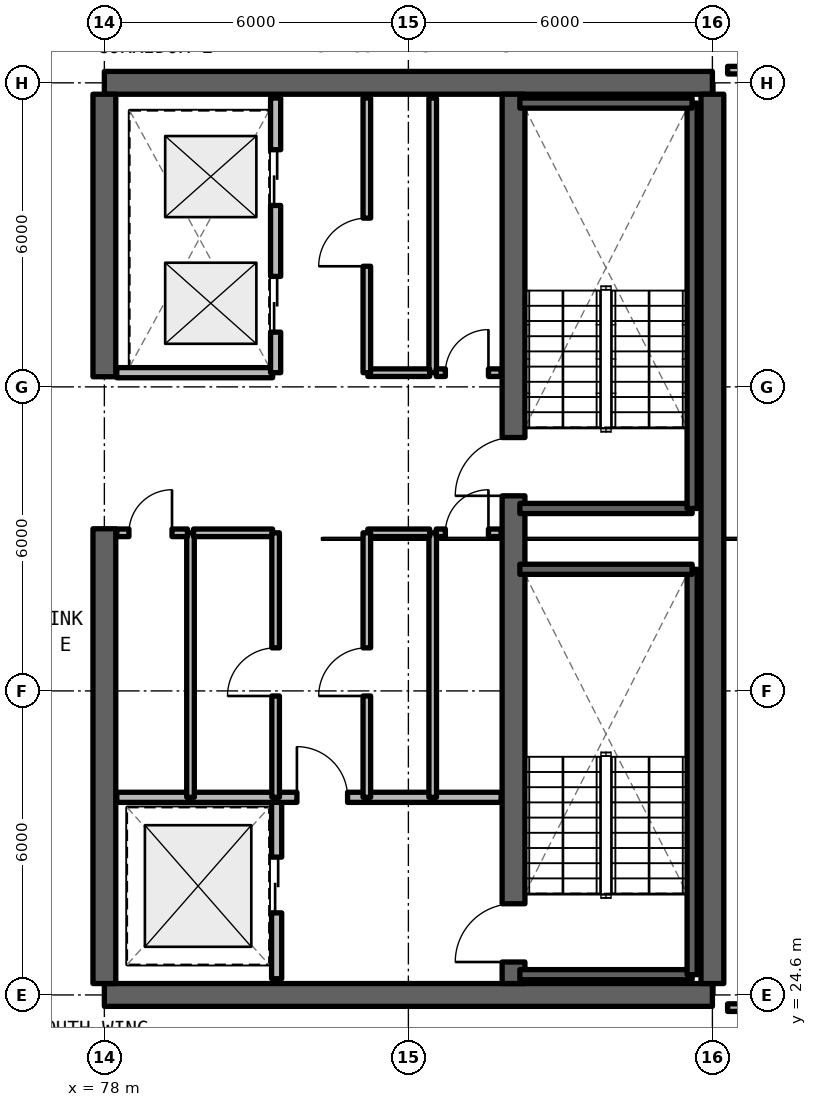
"""IFC4 building model, lengths in metres.
Left out: names, types, materials, properties, quantities, classifications, styles, units other than length and angle.
Written with IfcOpenShell. Run it as: python <this file> out.ifc"""

import sys

from ifc_helpers import new_model, si_unit, direction, frame, frame_2d, origin, place, context, subcontext, project, spatial, rectangle, extrude, element, fill, save


model = new_model("IFC4")
c1 = context("Model", 3, precision=1e-05, world=origin(), true_north=direction((0.0, 1.0)))
c2 = subcontext(c1, "Body", "Model", "MODEL_VIEW")
j1 = project(units=[si_unit("LENGTHUNIT", "METRE"), si_unit("PLANEANGLEUNIT", "RADIAN")], contexts=[c1])
p1 = place(None, origin())
s1 = spatial("IfcSite", under=j1, at=p1, CompositionType="ELEMENT")
p2 = place(p1, origin())
s2 = spatial("IfcBuilding", under=s1, at=p2, CompositionType="ELEMENT")
p3 = place(p2, frame((0.0, 0.0, 235.95)))
s3 = spatial("IfcBuildingStorey", under=s2, at=p3, CompositionType="ELEMENT", Elevation=235.95)
for number, where, z_axis, x_axis in (
    (1, (78.0, 24.6, 0.0), (0.0, 0.0, 1.0), (1.0, 0.0, 0.0)),
    (2, (90.0, 42.6, 0.0), (0.0, 0.0, 1.0), (-1.0, 0.0, 0.0)),
):
    element("IfcWall", number, at=place(p3, frame(where, z_axis=z_axis, x_axis=x_axis)), inside=s3, PredefinedType="SHEAR", context=c2, shape_type="SweptSolid", body=[
        extrude(rectangle(XDim=12.0, YDim=0.45, at=frame_2d((6.0, 0.0))), origin(), (0.0, 0.0, 1.0), 3.3),
    ])
p4 = place(p3, frame((90.0, 24.825, 0.0), z_axis=(0.0, 0.0, 1.0), x_axis=(0.0, 1.0, 0.0)))
e3 = element("IfcWall", 3, at=p4, inside=s3, PredefinedType="SHEAR", context=c2, shape_type="SweptSolid", body=[
    extrude(rectangle(XDim=17.55, YDim=0.45, at=frame_2d((8.775, 0.0))), origin(), (0.0, 0.0, 1.0), 3.3),
])
p5 = place(p3, frame((78.0, 24.825, 0.0), z_axis=(0.0, 0.0, 1.0), x_axis=(0.0, 1.0, 0.0)))
e4 = element("IfcWall", 4, at=p5, inside=s3, PredefinedType="SHEAR", context=c2, shape_type="SweptSolid", body=[
    extrude(rectangle(XDim=8.975, YDim=0.45, at=frame_2d((4.488, 0.0))), origin(), (0.0, 0.0, 1.0), 3.3),
])
p6 = place(p3, frame((78.0, 36.8, 0.0), z_axis=(0.0, 0.0, 1.0), x_axis=(0.0, 1.0, 0.0)))
e5 = element("IfcWall", 5, at=p6, inside=s3, PredefinedType="SHEAR", context=c2, shape_type="SweptSolid", body=[
    extrude(rectangle(XDim=5.575, YDim=0.45, at=frame_2d((2.788, 0.0))), origin(), (0.0, 0.0, 1.0), 3.3),
])
p7 = place(p3, frame((86.075, 24.825, 0.0), z_axis=(0.0, 0.0, 1.0), x_axis=(0.0, 1.0, 0.0)))
e6 = element("IfcWall", 6, at=p7, inside=s3, PredefinedType="SHEAR", context=c2, shape_type="SweptSolid", body=[
    extrude(rectangle(XDim=17.55, YDim=0.45, at=frame_2d((8.775, 0.0))), origin(), (0.0, 0.0, 1.0), 3.3),
])
p8 = place(p7, frame((0.425, 0.0, 0.0)))
e7 = element("IfcOpeningElement", 7, at=p8, cuts=e6, PredefinedType="OPENING", context=c2, shape_type="SweptSolid", body=[
    extrude(rectangle(XDim=1.15, YDim=2.15, at=frame_2d((0.575, 1.075))), frame((0.0, 0.235, 0.0), z_axis=(0.0, -1.0, 0.0), x_axis=(1.0, 0.0, 0.0)), (0.0, 0.0, 1.0), 0.47),
])
p9 = place(p7, frame((9.625, 0.0, 0.0)))
e8 = element("IfcOpeningElement", 8, at=p9, cuts=e6, PredefinedType="OPENING", context=c2, shape_type="SweptSolid", body=[
    extrude(rectangle(XDim=1.15, YDim=2.15, at=frame_2d((0.575, 1.075))), frame((0.0, 0.235, 0.0), z_axis=(0.0, -1.0, 0.0), x_axis=(1.0, 0.0, 0.0)), (0.0, 0.0, 1.0), 0.47),
])
p10 = place(p3, frame((81.4, 24.92, 0.0), z_axis=(0.0, 0.0, 1.0), x_axis=(0.0, 1.0, 0.0)))
e9 = element("IfcWall", 9, at=p10, inside=s3, PredefinedType="SOLIDWALL", context=c2, shape_type="SweptSolid", body=[
    extrude(rectangle(XDim=3.58, YDim=0.2, at=frame_2d((1.79, 0.0))), origin(), (0.0, 0.0, 1.0), 2.35),
])
p11 = place(p10, frame((1.3, 0.0, 0.0)))
e10 = element("IfcOpeningElement", 10, at=p11, cuts=e9, PredefinedType="OPENING", context=c2, shape_type="SweptSolid", body=[
    extrude(rectangle(XDim=1.1, YDim=2.2, at=frame_2d((0.55, 1.1))), frame((0.0, 0.11, 0.0), z_axis=(0.0, -1.0, 0.0), x_axis=(1.0, 0.0, 0.0)), (0.0, 0.0, 1.0), 0.22),
])
p12 = place(p3, frame((78.245, 28.5, 0.0), z_axis=(0.0, 0.0, 1.0), x_axis=(1.0, 0.0, 0.0)))
e11 = element("IfcWall", 11, at=p12, inside=s3, PredefinedType="SOLIDWALL", context=c2, shape_type="SweptSolid", body=[
    extrude(rectangle(XDim=7.585, YDim=0.2, at=frame_2d((3.792, 0.0))), origin(), (0.0, 0.0, 1.0), 2.35),
])
p13 = place(p12, frame((3.555, 0.0, 0.0)))
e12 = element("IfcOpeningElement", 12, at=p13, cuts=e11, PredefinedType="OPENING", context=c2, shape_type="SweptSolid", body=[
    extrude(rectangle(XDim=1.0, YDim=2.15, at=frame_2d((0.5, 1.075))), frame((0.0, 0.11, 0.0), z_axis=(0.0, -1.0, 0.0), x_axis=(1.0, 0.0, 0.0)), (0.0, 0.0, 1.0), 0.22),
])
p14 = place(p3, frame((84.48, 28.5, 0.0), z_axis=(0.0, 0.0, 1.0), x_axis=(0.0, 1.0, 0.0)))
e13 = element("IfcWall", 13, at=p14, inside=s3, PredefinedType="SOLIDWALL", context=c2, shape_type="SweptSolid", body=[
    extrude(rectangle(XDim=5.22, YDim=0.15, at=frame_2d((2.61, 0.0))), origin(), (0.0, 0.0, 1.0), 2.35),
])
p15 = place(p3, frame((84.55, 33.72, 0.0), z_axis=(0.0, 0.0, 1.0), x_axis=(1.0, 0.0, 0.0)))
e14 = element("IfcWall", 14, at=p15, inside=s3, PredefinedType="SOLIDWALL", context=c2, shape_type="SweptSolid", body=[
    extrude(rectangle(XDim=1.28, YDim=0.15, at=frame_2d((0.64, 0.0))), origin(), (0.0, 0.0, 1.0), 2.35),
])
p16 = place(p15, frame((0.18, 0.0, 0.0)))
e15 = element("IfcOpeningElement", 15, at=p16, cuts=e14, PredefinedType="OPENING", context=c2, shape_type="SweptSolid", body=[
    extrude(rectangle(XDim=0.85, YDim=2.1, at=frame_2d((0.425, 1.05))), frame((0.0, 0.085, 0.0), z_axis=(0.0, -1.0, 0.0), x_axis=(1.0, 0.0, 0.0)), (0.0, 0.0, 1.0), 0.17),
])
p17 = place(p3, frame((83.2, 33.72, 0.0), z_axis=(0.0, 0.0, 1.0), x_axis=(1.0, 0.0, 0.0)))
e16 = element("IfcWall", 16, at=p17, inside=s3, PredefinedType="SOLIDWALL", context=c2, shape_type="SweptSolid", body=[
    extrude(rectangle(XDim=1.22, YDim=0.15, at=frame_2d((0.61, 0.0))), origin(), (0.0, 0.0, 1.0), 2.35),
])
p18 = place(p3, frame((83.18, 28.5, 0.0), z_axis=(0.0, 0.0, 1.0), x_axis=(0.0, 1.0, 0.0)))
e17 = element("IfcWall", 17, at=p18, inside=s3, PredefinedType="SOLIDWALL", context=c2, shape_type="SweptSolid", body=[
    extrude(rectangle(XDim=5.22, YDim=0.15, at=frame_2d((2.61, 0.0))), origin(), (0.0, 0.0, 1.0), 2.35),
])
p19 = place(p18, frame((2.0, 0.0, 0.0)))
e18 = element("IfcOpeningElement", 18, at=p19, cuts=e17, PredefinedType="OPENING", context=c2, shape_type="SweptSolid", body=[
    extrude(rectangle(XDim=0.95, YDim=2.15, at=frame_2d((0.475, 1.075))), frame((0.0, 0.085, 0.0), z_axis=(0.0, -1.0, 0.0), x_axis=(1.0, 0.0, 0.0)), (0.0, 0.0, 1.0), 0.17),
])
p20 = place(p3, frame((79.7, 28.5, 0.0), z_axis=(0.0, 0.0, 1.0), x_axis=(0.0, 1.0, 0.0)))
e19 = element("IfcWall", 19, at=p20, inside=s3, PredefinedType="SOLIDWALL", context=c2, shape_type="SweptSolid", body=[
    extrude(rectangle(XDim=5.22, YDim=0.15, at=frame_2d((2.61, 0.0))), origin(), (0.0, 0.0, 1.0), 2.35),
])
p21 = place(p3, frame((79.76, 33.72, 0.0), z_axis=(0.0, 0.0, 1.0), x_axis=(1.0, 0.0, 0.0)))
e20 = element("IfcWall", 20, at=p21, inside=s3, PredefinedType="SOLIDWALL", context=c2, shape_type="SweptSolid", body=[
    extrude(rectangle(XDim=1.56, YDim=0.15, at=frame_2d((0.78, 0.0))), origin(), (0.0, 0.0, 1.0), 2.35),
])
p22 = place(p3, frame((78.245, 33.72, 0.0), z_axis=(0.0, 0.0, 1.0), x_axis=(1.0, 0.0, 0.0)))
e21 = element("IfcWall", 21, at=p22, inside=s3, PredefinedType="SOLIDWALL", context=c2, shape_type="SweptSolid", body=[
    extrude(rectangle(XDim=1.395, YDim=0.15, at=frame_2d((0.697, 0.0))), origin(), (0.0, 0.0, 1.0), 2.35),
])
p23 = place(p22, frame((0.24, 0.0, 0.0)))
e22 = element("IfcOpeningElement", 22, at=p23, cuts=e21, PredefinedType="OPENING", context=c2, shape_type="SweptSolid", body=[
    extrude(rectangle(XDim=0.85, YDim=2.1, at=frame_2d((0.425, 1.05))), frame((0.0, 0.085, 0.0), z_axis=(0.0, -1.0, 0.0), x_axis=(1.0, 0.0, 0.0)), (0.0, 0.0, 1.0), 0.17),
])
p24 = place(p3, frame((81.38, 28.5, 0.0), z_axis=(0.0, 0.0, 1.0), x_axis=(0.0, 1.0, 0.0)))
e23 = element("IfcWall", 23, at=p24, inside=s3, PredefinedType="SOLIDWALL", context=c2, shape_type="SweptSolid", body=[
    extrude(rectangle(XDim=5.22, YDim=0.15, at=frame_2d((2.61, 0.0))), origin(), (0.0, 0.0, 1.0), 2.35),
])
p25 = place(p24, frame((2.0, 0.0, 0.0)))
e24 = element("IfcOpeningElement", 24, at=p25, cuts=e23, PredefinedType="OPENING", context=c2, shape_type="SweptSolid", body=[
    extrude(rectangle(XDim=0.95, YDim=2.15, at=frame_2d((0.475, 1.075))), frame((0.0, 0.085, 0.0), z_axis=(0.0, -1.0, 0.0), x_axis=(1.0, 0.0, 0.0)), (0.0, 0.0, 1.0), 0.17),
])
p26 = place(p3, frame((84.48, 36.88, 0.0), z_axis=(0.0, 0.0, 1.0), x_axis=(0.0, 1.0, 0.0)))
e25 = element("IfcWall", 25, at=p26, inside=s3, PredefinedType="SOLIDWALL", context=c2, shape_type="SweptSolid", body=[
    extrude(rectangle(XDim=5.42, YDim=0.15, at=frame_2d((2.71, 0.0))), origin(), (0.0, 0.0, 1.0), 2.35),
])
p27 = place(p3, frame((84.55, 36.88, 0.0), z_axis=(0.0, 0.0, 1.0), x_axis=(1.0, 0.0, 0.0)))
e26 = element("IfcWall", 26, at=p27, inside=s3, PredefinedType="SOLIDWALL", context=c2, shape_type="SweptSolid", body=[
    extrude(rectangle(XDim=1.28, YDim=0.15, at=frame_2d((0.64, 0.0))), origin(), (0.0, 0.0, 1.0), 2.35),
])
p28 = place(p27, frame((0.18, 0.0, 0.0)))
e27 = element("IfcOpeningElement", 27, at=p28, cuts=e26, PredefinedType="OPENING", context=c2, shape_type="SweptSolid", body=[
    extrude(rectangle(XDim=0.85, YDim=2.1, at=frame_2d((0.425, 1.05))), frame((0.0, 0.085, 0.0), z_axis=(0.0, -1.0, 0.0), x_axis=(1.0, 0.0, 0.0)), (0.0, 0.0, 1.0), 0.17),
])
p29 = place(p3, frame((83.2, 36.88, 0.0), z_axis=(0.0, 0.0, 1.0), x_axis=(1.0, 0.0, 0.0)))
e28 = element("IfcWall", 28, at=p29, inside=s3, PredefinedType="SOLIDWALL", context=c2, shape_type="SweptSolid", body=[
    extrude(rectangle(XDim=1.22, YDim=0.15, at=frame_2d((0.61, 0.0))), origin(), (0.0, 0.0, 1.0), 2.35),
])
p30 = place(p3, frame((83.18, 36.88, 0.0), z_axis=(0.0, 0.0, 1.0), x_axis=(0.0, 1.0, 0.0)))
e29 = element("IfcWall", 29, at=p30, inside=s3, PredefinedType="SOLIDWALL", context=c2, shape_type="SweptSolid", body=[
    extrude(rectangle(XDim=5.42, YDim=0.15, at=frame_2d((2.71, 0.0))), origin(), (0.0, 0.0, 1.0), 2.35),
])
p31 = place(p30, frame((2.1, 0.0, 0.0)))
e30 = element("IfcOpeningElement", 30, at=p31, cuts=e29, PredefinedType="OPENING", context=c2, shape_type="SweptSolid", body=[
    extrude(rectangle(XDim=0.95, YDim=2.15, at=frame_2d((0.475, 1.075))), frame((0.0, 0.085, 0.0), z_axis=(0.0, -1.0, 0.0), x_axis=(1.0, 0.0, 0.0)), (0.0, 0.0, 1.0), 0.17),
])
p32 = place(p3, frame((78.245, 36.88, 0.0), z_axis=(0.0, 0.0, 1.0), x_axis=(1.0, 0.0, 0.0)))
e31 = element("IfcWall", 31, at=p32, inside=s3, PredefinedType="SOLIDWALL", context=c2, shape_type="SweptSolid", body=[
    extrude(rectangle(XDim=3.075, YDim=0.2, at=frame_2d((1.538, 0.0))), origin(), (0.0, 0.0, 1.0), 2.35),
])
p33 = place(p3, frame((81.38, 36.88, 0.0), z_axis=(0.0, 0.0, 1.0), x_axis=(0.0, 1.0, 0.0)))
e32 = element("IfcWall", 32, at=p33, inside=s3, PredefinedType="SOLIDWALL", context=c2, shape_type="SweptSolid", body=[
    extrude(rectangle(XDim=5.42, YDim=0.2, at=frame_2d((2.71, 0.0))), origin(), (0.0, 0.0, 1.0), 2.35),
])
p34 = place(p33, frame((0.8, 0.0, 0.0)))
e33 = element("IfcOpeningElement", 33, at=p34, cuts=e32, PredefinedType="OPENING", context=c2, shape_type="SweptSolid", body=[
    extrude(rectangle(XDim=1.1, YDim=2.2, at=frame_2d((0.55, 1.1))), frame((0.0, 0.11, 0.0), z_axis=(0.0, -1.0, 0.0), x_axis=(1.0, 0.0, 0.0)), (0.0, 0.0, 1.0), 0.22),
])
p35 = place(p33, frame((3.3, 0.0, 0.0)))
e34 = element("IfcOpeningElement", 34, at=p35, cuts=e32, PredefinedType="OPENING", context=c2, shape_type="SweptSolid", body=[
    extrude(rectangle(XDim=1.1, YDim=2.2, at=frame_2d((0.55, 1.1))), frame((0.0, 0.11, 0.0), z_axis=(0.0, -1.0, 0.0), x_axis=(1.0, 0.0, 0.0)), (0.0, 0.0, 1.0), 0.22),
])
p36 = place(p3, frame((90.3, 24.35, 0.0), z_axis=(0.0, 0.0, 1.0), x_axis=(1.0, 0.0, 0.0)))
e35 = element("IfcWall", 35, at=p36, inside=s3, PredefinedType="SOLIDWALL", context=c2, shape_type="SweptSolid", body=[
    extrude(rectangle(XDim=8.52, YDim=0.15, at=frame_2d((4.26, 0.0))), origin(), (0.0, 0.0, 1.0), 2.35),
])
p37 = place(p36, frame((0.975, 0.0, 0.0)))
e36 = element("IfcOpeningElement", 36, at=p37, cuts=e35, PredefinedType="OPENING", context=c2, shape_type="SweptSolid", body=[
    extrude(rectangle(XDim=0.95, YDim=2.15, at=frame_2d((0.475, 1.075))), frame((0.0, 0.085, 0.0), z_axis=(0.0, -1.0, 0.0), x_axis=(1.0, 0.0, 0.0)), (0.0, 0.0, 1.0), 0.17),
])
p38 = place(p3, frame((90.3, 42.85, 0.0), z_axis=(0.0, 0.0, 1.0), x_axis=(1.0, 0.0, 0.0)))
e37 = element("IfcWall", 37, at=p38, inside=s3, PredefinedType="SOLIDWALL", context=c2, shape_type="SweptSolid", body=[
    extrude(rectangle(XDim=8.52, YDim=0.15, at=frame_2d((4.26, 0.0))), origin(), (0.0, 0.0, 1.0), 2.35),
])
p39 = place(p3, frame((86.2, 25.0, 0.0), z_axis=(0.0, 0.0, 1.0), x_axis=(1.0, 0.0, 0.0)))
e38 = element("IfcWall", 38, at=p39, inside=s3, PredefinedType="SOLIDWALL", context=c2, shape_type="SweptSolid", body=[
    extrude(rectangle(XDim=3.4, YDim=0.2, at=frame_2d((1.7, 0.0))), origin(), (0.0, 0.0, 1.0), 3.3),
])
p40 = place(p3, frame((89.6, 25.0, 0.0), z_axis=(0.0, 0.0, 1.0), x_axis=(0.0, 1.0, 0.0)))
e39 = element("IfcWall", 39, at=p40, inside=s3, PredefinedType="SOLIDWALL", context=c2, shape_type="SweptSolid", body=[
    extrude(rectangle(XDim=8.0, YDim=0.2, at=frame_2d((4.0, 0.0))), origin(), (0.0, 0.0, 1.0), 3.3),
])
for number, where, z_axis, x_axis in (
    (40, (89.6, 33.0, 0.0), (0.0, 0.0, 1.0), (-1.0, 0.0, 0.0)),
    (41, (86.2, 34.2, 0.0), (0.0, 0.0, 1.0), (1.0, 0.0, 0.0)),
):
    element("IfcWall", number, at=place(p3, frame(where, z_axis=z_axis, x_axis=x_axis)), inside=s3, PredefinedType="SOLIDWALL", context=c2, shape_type="SweptSolid", body=[
        extrude(rectangle(XDim=3.4, YDim=0.2, at=frame_2d((1.7, 0.0))), origin(), (0.0, 0.0, 1.0), 3.3),
    ])
p41 = place(p3, frame((89.6, 34.2, 0.0), z_axis=(0.0, 0.0, 1.0), x_axis=(0.0, 1.0, 0.0)))
e42 = element("IfcWall", 42, at=p41, inside=s3, PredefinedType="SOLIDWALL", context=c2, shape_type="SweptSolid", body=[
    extrude(rectangle(XDim=8.0, YDim=0.2, at=frame_2d((4.0, 0.0))), origin(), (0.0, 0.0, 1.0), 3.3),
])
p42 = place(p3, frame((89.6, 42.2, 0.0), z_axis=(0.0, 0.0, 1.0), x_axis=(-1.0, 0.0, 0.0)))
e43 = element("IfcWall", 43, at=p42, inside=s3, PredefinedType="SOLIDWALL", context=c2, shape_type="SweptSolid", body=[
    extrude(rectangle(XDim=3.4, YDim=0.2, at=frame_2d((1.7, 0.0))), origin(), (0.0, 0.0, 1.0), 3.3),
])
p43 = place(p11, origin())
e44 = element("IfcDoor", 44, at=p43, inside=s3, OperationType="SLIDING_TO_LEFT", PredefinedType="DOOR", context=c2, shape_type="SweptSolid", body=[
    extrude(rectangle(XDim=1.1, YDim=2.2, at=frame_2d((0.55, 1.1))), frame((0.0, 0.025, 0.0), z_axis=(0.0, -1.0, 0.0), x_axis=(1.0, 0.0, 0.0)), (0.0, 0.0, 1.0), 0.05),
])
fill(e10, e44)
p44 = place(p13, origin())
e45 = element("IfcDoor", 45, at=p44, inside=s3, OperationType="SINGLE_SWING_LEFT", PredefinedType="DOOR", context=c2, shape_type="SweptSolid", body=[
    extrude(rectangle(XDim=1.0, YDim=2.15, at=frame_2d((0.5, 1.075))), frame((0.0, 0.025, 0.0), z_axis=(0.0, -1.0, 0.0), x_axis=(1.0, 0.0, 0.0)), (0.0, 0.0, 1.0), 0.05),
])
fill(e12, e45)
p45 = place(p16, origin())
e46 = element("IfcDoor", 46, at=p45, inside=s3, OperationType="SINGLE_SWING_RIGHT", PredefinedType="DOOR", context=c2, shape_type="SweptSolid", body=[
    extrude(rectangle(XDim=0.85, YDim=2.1, at=frame_2d((0.425, 1.05))), frame((0.0, 0.025, 0.0), z_axis=(0.0, -1.0, 0.0), x_axis=(1.0, 0.0, 0.0)), (0.0, 0.0, 1.0), 0.05),
])
fill(e15, e46)
p46 = place(p19, origin())
e47 = element("IfcDoor", 47, at=p46, inside=s3, OperationType="SINGLE_SWING_LEFT", PredefinedType="DOOR", context=c2, shape_type="SweptSolid", body=[
    extrude(rectangle(XDim=0.95, YDim=2.15, at=frame_2d((0.475, 1.075))), frame((0.0, 0.025, 0.0), z_axis=(0.0, -1.0, 0.0), x_axis=(1.0, 0.0, 0.0)), (0.0, 0.0, 1.0), 0.05),
])
fill(e18, e47)
p47 = place(p23, origin())
e48 = element("IfcDoor", 48, at=p47, inside=s3, OperationType="SINGLE_SWING_RIGHT", PredefinedType="DOOR", context=c2, shape_type="SweptSolid", body=[
    extrude(rectangle(XDim=0.85, YDim=2.1, at=frame_2d((0.425, 1.05))), frame((0.0, 0.025, 0.0), z_axis=(0.0, -1.0, 0.0), x_axis=(1.0, 0.0, 0.0)), (0.0, 0.0, 1.0), 0.05),
])
fill(e22, e48)
p48 = place(p25, origin())
e49 = element("IfcDoor", 49, at=p48, inside=s3, OperationType="SINGLE_SWING_LEFT", PredefinedType="DOOR", context=c2, shape_type="SweptSolid", body=[
    extrude(rectangle(XDim=0.95, YDim=2.15, at=frame_2d((0.475, 1.075))), frame((0.0, 0.025, 0.0), z_axis=(0.0, -1.0, 0.0), x_axis=(1.0, 0.0, 0.0)), (0.0, 0.0, 1.0), 0.05),
])
fill(e24, e49)
p49 = place(p28, origin())
e50 = element("IfcDoor", 50, at=p49, inside=s3, OperationType="SINGLE_SWING_RIGHT", PredefinedType="DOOR", context=c2, shape_type="SweptSolid", body=[
    extrude(rectangle(XDim=0.85, YDim=2.1, at=frame_2d((0.425, 1.05))), frame((0.0, 0.025, 0.0), z_axis=(0.0, -1.0, 0.0), x_axis=(1.0, 0.0, 0.0)), (0.0, 0.0, 1.0), 0.05),
])
fill(e27, e50)
p50 = place(p31, origin())
e51 = element("IfcDoor", 51, at=p50, inside=s3, OperationType="SINGLE_SWING_LEFT", PredefinedType="DOOR", context=c2, shape_type="SweptSolid", body=[
    extrude(rectangle(XDim=0.95, YDim=2.15, at=frame_2d((0.475, 1.075))), frame((0.0, 0.025, 0.0), z_axis=(0.0, -1.0, 0.0), x_axis=(1.0, 0.0, 0.0)), (0.0, 0.0, 1.0), 0.05),
])
fill(e30, e51)
p51 = place(p34, origin())
e52 = element("IfcDoor", 52, at=p51, inside=s3, OperationType="SLIDING_TO_LEFT", PredefinedType="DOOR", context=c2, shape_type="SweptSolid", body=[
    extrude(rectangle(XDim=1.1, YDim=2.2, at=frame_2d((0.55, 1.1))), frame((0.0, 0.025, 0.0), z_axis=(0.0, -1.0, 0.0), x_axis=(1.0, 0.0, 0.0)), (0.0, 0.0, 1.0), 0.05),
])
fill(e33, e52)
p52 = place(p35, origin())
e53 = element("IfcDoor", 53, at=p52, inside=s3, OperationType="SLIDING_TO_RIGHT", PredefinedType="DOOR", context=c2, shape_type="SweptSolid", body=[
    extrude(rectangle(XDim=1.1, YDim=2.2, at=frame_2d((0.55, 1.1))), frame((0.0, 0.025, 0.0), z_axis=(0.0, -1.0, 0.0), x_axis=(1.0, 0.0, 0.0)), (0.0, 0.0, 1.0), 0.05),
])
fill(e34, e53)
p53 = place(p8, origin())
e54 = element("IfcDoor", 54, at=p53, inside=s3, OperationType="SINGLE_SWING_LEFT", PredefinedType="DOOR", context=c2, shape_type="SweptSolid", body=[
    extrude(rectangle(XDim=1.15, YDim=2.15, at=frame_2d((0.575, 1.075))), frame((0.0, 0.025, 0.0), z_axis=(0.0, -1.0, 0.0), x_axis=(1.0, 0.0, 0.0)), (0.0, 0.0, 1.0), 0.05),
])
fill(e7, e54)
p54 = place(p9, origin())
e55 = element("IfcDoor", 55, at=p54, inside=s3, OperationType="SINGLE_SWING_RIGHT", PredefinedType="DOOR", context=c2, shape_type="SweptSolid", body=[
    extrude(rectangle(XDim=1.15, YDim=2.15, at=frame_2d((0.575, 1.075))), frame((0.0, 0.025, 0.0), z_axis=(0.0, -1.0, 0.0), x_axis=(1.0, 0.0, 0.0)), (0.0, 0.0, 1.0), 0.05),
])
fill(e8, e55)
save(model, sys.argv[1])
